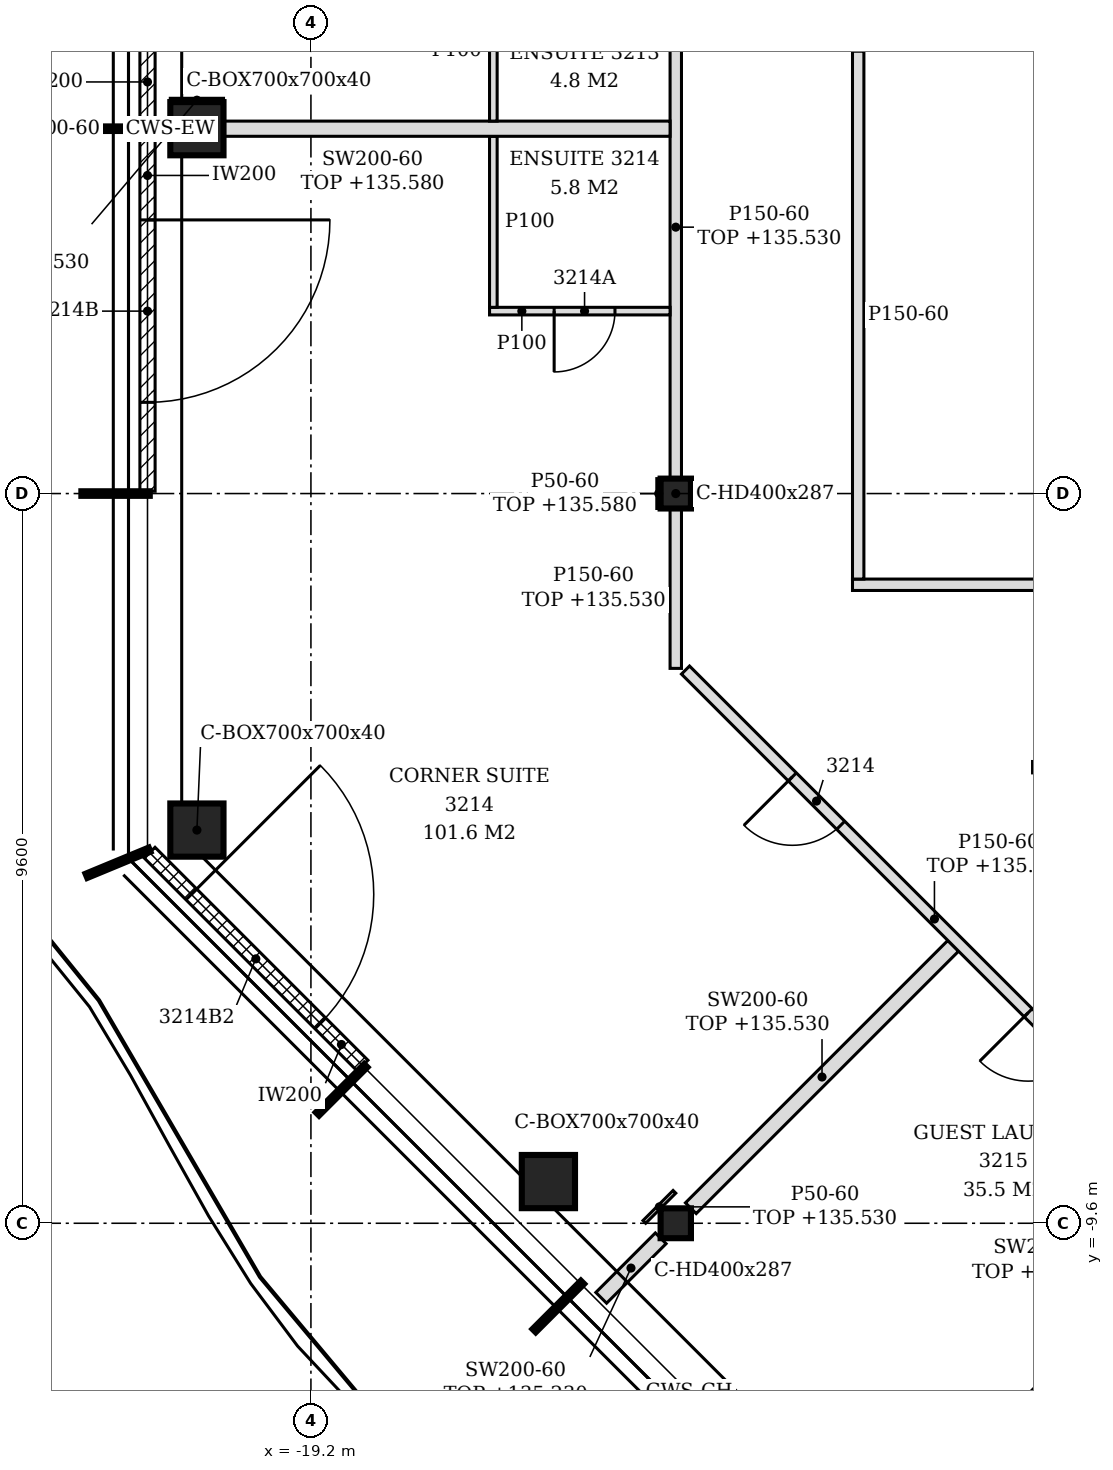
"""IFC4 building model, lengths in metres.
Left out: names, types, materials, properties, quantities, classifications, styles, units other than length and angle.
Written with IfcOpenShell. Run it as: python <this file> out.ifc"""

import sys

from ifc_helpers import new_model, si_unit, direction, frame, frame_2d, origin, origin_2d, place, context, subcontext, project, spatial, polyline, rectangle, hollow_rectangle, i_section, outline, extrude, element, fill, save


model = new_model("IFC4")
c1 = context("Model", 3, precision=1e-05, world=origin(), true_north=direction((0.0, 1.0)))
c2 = subcontext(c1, "Body", "Model", "MODEL_VIEW")
j1 = project(units=[si_unit("LENGTHUNIT", "METRE"), si_unit("PLANEANGLEUNIT", "RADIAN")], contexts=[c1])
p1 = place(None, origin())
s1 = spatial("IfcSite", under=j1, at=p1, CompositionType="ELEMENT")
p2 = place(p1, origin())
s2 = spatial("IfcBuilding", under=s1, at=p2, CompositionType="ELEMENT")
p3 = place(p2, frame((0.0, 0.0, 132.6)))
s3 = spatial("IfcBuildingStorey", under=s2, at=p3, CompositionType="ELEMENT", Elevation=132.6)
for number, where, z_axis, x_axis in (
    (1, (-20.7, 4.8, -0.15), (0.0, 0.0, 1.0), (1.0, 0.0, 0.0)),
    (2, (-20.7, -4.427, -0.15), (0.0, 0.0, 1.0), (1.0, 0.0, 0.0)),
    (3, (-16.076, -9.052, -0.15), (0.0, 0.0, 1.0), (1.0, 0.0, 0.0)),
):
    element("IfcColumn", number, at=place(p3, frame(where, z_axis=z_axis, x_axis=x_axis)), inside=s3, PredefinedType="COLUMN", context=c2, shape_type="SweptSolid", body=[
        extrude(hollow_rectangle(XDim=0.7, YDim=0.7, WallThickness=0.04, at=origin_2d()), origin(), (0.0, 0.0, 1.0), 3.6),
    ])
for number, where, z_axis, x_axis in (
    (4, (-14.4, -9.6, -0.15), (0.0, 0.0, 1.0), (1.0, 0.0, 0.0)),
    (5, (-14.4, 0.0, -0.15), (0.0, 0.0, 1.0), (1.0, 0.0, 0.0)),
):
    element("IfcColumn", number, at=place(p3, frame(where, z_axis=z_axis, x_axis=x_axis)), inside=s3, PredefinedType="COLUMN", context=c2, shape_type="SweptSolid", body=[
        extrude(i_section(OverallWidth=0.399, OverallDepth=0.393, WebThickness=0.023, FlangeThickness=0.037, FilletRadius=0.015, at=origin_2d()), origin(), (0.0, 0.0, 1.0), 3.6),
    ])
p4 = place(p3, frame((-21.35, 9.57, 0.0), z_axis=(0.0, 0.0, 1.0), x_axis=(0.0, -1.0, 0.0)))
e6 = element("IfcWall", 6, at=p4, inside=s3, PredefinedType="NOTDEFINED", context=c2, shape_type="SweptSolid", body=[
    extrude(rectangle(XDim=4.74, YDim=0.2, at=frame_2d((2.37, 0.0))), origin(), (0.0, 0.0, 1.0), 3.45),
])
p5 = place(p4, frame((1.17, 0.0, 0.0)))
e7 = element("IfcOpeningElement", 7, at=p5, cuts=e6, PredefinedType="OPENING", context=c2, shape_type="SweptSolid", body=[
    extrude(rectangle(XDim=2.4, YDim=2.4, at=frame_2d((1.2, 1.2))), frame((0.0, 0.11, 0.0), z_axis=(0.0, -1.0, 0.0), x_axis=(1.0, 0.0, 0.0)), (0.0, 0.0, 1.0), 0.22),
])
p6 = place(p3, frame((-21.35, 4.77, 0.0), z_axis=(0.0, 0.0, 1.0), x_axis=(0.0, -1.0, 0.0)))
e8 = element("IfcWall", 8, at=p6, inside=s3, PredefinedType="NOTDEFINED", context=c2, shape_type="SweptSolid", body=[
    extrude(rectangle(XDim=4.74, YDim=0.2, at=frame_2d((2.37, 0.0))), origin(), (0.0, 0.0, 1.0), 3.45),
])
p7 = place(p6, frame((1.17, 0.0, 0.0)))
e9 = element("IfcOpeningElement", 9, at=p7, cuts=e8, PredefinedType="OPENING", context=c2, shape_type="SweptSolid", body=[
    extrude(rectangle(XDim=2.4, YDim=2.4, at=frame_2d((1.2, 1.2))), frame((0.0, 0.11, 0.0), z_axis=(0.0, -1.0, 0.0), x_axis=(1.0, 0.0, 0.0)), (0.0, 0.0, 1.0), 0.22),
])
p8 = place(p3, frame((-21.322, -4.725, 0.0), z_axis=(0.0, 0.0, 1.0), x_axis=(0.707106781187, -0.707106781187, 0.0)))
e10 = element("IfcWall", 10, at=p8, inside=s3, PredefinedType="NOTDEFINED", context=c2, shape_type="SweptSolid", body=[
    extrude(rectangle(XDim=3.962, YDim=0.2, at=frame_2d((1.981, 0.0))), origin(), (0.0, 0.0, 1.0), 3.45),
])
p9 = place(p8, frame((0.775, 0.0, 0.0)))
e11 = element("IfcOpeningElement", 11, at=p9, cuts=e10, PredefinedType="OPENING", context=c2, shape_type="SweptSolid", body=[
    extrude(rectangle(XDim=2.4, YDim=2.4, at=frame_2d((1.2, 1.2))), frame((0.0, 0.11, 0.0), z_axis=(0.0, -1.0, 0.0), x_axis=(1.0, 0.0, 0.0)), (0.0, 0.0, 1.0), 0.22),
])
p10 = place(p3, frame((-11.102, -13.326, 0.0), z_axis=(0.0, 0.0, 1.0), x_axis=(0.707088722709, 0.707124839203, 0.0)))
e12 = element("IfcWall", 12, at=p10, inside=s3, PredefinedType="PARTITIONING", context=c2, shape_type="SweptSolid", body=[
    extrude(rectangle(XDim=6.76, YDim=0.2, at=frame_2d((3.38, 0.0))), origin(), (0.0, 0.0, 1.0), 2.93),
])
p11 = place(p3, frame((-15.381, -10.581, 0.0), z_axis=(0.0, 0.0, 1.0), x_axis=(0.707217034054, 0.706996511125, 0.0)))
e13 = element("IfcWall", 13, at=p11, inside=s3, PredefinedType="PARTITIONING", context=c2, shape_type="SweptSolid", body=[
    extrude(rectangle(XDim=1.107, YDim=0.2, at=frame_2d((0.554, 0.0))), origin(), (0.0, 0.0, 1.0), 2.63),
])
p12 = place(p3, frame((-14.202, -9.402, 0.0), z_axis=(0.0, 0.0, 1.0), x_axis=(0.707081776084, 0.707131785404, 0.0)))
e14 = element("IfcWall", 14, at=p12, inside=s3, PredefinedType="PARTITIONING", context=c2, shape_type="SweptSolid", body=[
    extrude(rectangle(XDim=4.882, YDim=0.2, at=frame_2d((2.441, 0.0))), origin(), (0.0, 0.0, 1.0), 2.93),
])
p13 = place(p3, frame((-8.322, -8.272, 0.0), z_axis=(0.0, 0.0, 1.0), x_axis=(-0.707106781187, 0.707106781187, 0.0)))
e15 = element("IfcWall", 15, at=p13, inside=s3, PredefinedType="PARTITIONING", context=c2, shape_type="SweptSolid", body=[
    extrude(rectangle(XDim=8.415, YDim=0.15, at=frame_2d((4.207, 0.0))), origin(), (0.0, 0.0, 1.0), 2.93),
])
p14 = place(p13, frame((5.527, 0.0, 0.0)))
e16 = element("IfcOpeningElement", 16, at=p14, cuts=e15, PredefinedType="OPENING", context=c2, shape_type="SweptSolid", body=[
    extrude(rectangle(XDim=0.9, YDim=2.1, at=frame_2d((0.45, 1.05))), frame((0.0, 0.085, 0.0), z_axis=(0.0, -1.0, 0.0), x_axis=(1.0, 0.0, 0.0)), (0.0, 0.0, 1.0), 0.17),
])
p15 = place(p13, frame((1.139, 0.0, 0.0)))
e17 = element("IfcOpeningElement", 17, at=p15, cuts=e15, PredefinedType="OPENING", context=c2, shape_type="SweptSolid", body=[
    extrude(rectangle(XDim=0.9, YDim=2.1, at=frame_2d((0.45, 1.05))), frame((0.0, 0.085, 0.0), z_axis=(0.0, -1.0, 0.0), x_axis=(1.0, 0.0, 0.0)), (0.0, 0.0, 1.0), 0.17),
])
p16 = place(p3, frame((-9.706, -3.6, 0.0), z_axis=(0.0, 0.0, 1.0), x_axis=(1.0, 0.0, 0.0)))
e18 = element("IfcWall", 18, at=p16, inside=s3, PredefinedType="PARTITIONING", context=c2, shape_type="SweptSolid", body=[
    extrude(outline(polyline([(0.0, 0.0), (4.981, 0.0), (4.981, 2.83), (4.756, 2.83), (4.754, 3.45), (0.0, 3.45), (0.0, 0.0)])), frame((0.0, 0.075, 0.0), z_axis=(0.0, -1.0, 0.0), x_axis=(1.0, 0.0, 0.0)), (0.0, 0.0, 1.0), 0.15),
])
p17 = place(p3, frame((-14.4, -2.3, 0.0), z_axis=(0.0, 0.0, 1.0), x_axis=(0.0, 1.0, 0.0)))
e19 = element("IfcWall", 19, at=p17, inside=s3, PredefinedType="PARTITIONING", context=c2, shape_type="SweptSolid", body=[
    extrude(rectangle(XDim=2.104, YDim=0.15, at=frame_2d((1.052, 0.0))), origin(), (0.0, 0.0, 1.0), 2.93),
])
p18 = place(p3, frame((-12.075, -1.2, 0.0), z_axis=(0.0, 0.0, 1.0), x_axis=(1.0, 0.0, 0.0)))
e20 = element("IfcWall", 20, at=p18, inside=s3, PredefinedType="PARTITIONING", context=c2, shape_type="SweptSolid", body=[
    extrude(outline(polyline([(0.0, 0.0), (7.35, 0.0), (7.35, 2.83), (7.125, 2.83), (7.123, 3.45), (0.0, 3.45), (0.0, 0.0)])), frame((0.0, 0.075, 0.0), z_axis=(0.0, -1.0, 0.0), x_axis=(1.0, 0.0, 0.0)), (0.0, 0.0, 1.0), 0.15),
])
p19 = place(p3, frame((-12.0, -1.125, 0.0), z_axis=(0.0, 0.0, 1.0), x_axis=(0.0, 1.0, 0.0)))
e21 = element("IfcWall", 21, at=p19, inside=s3, PredefinedType="PARTITIONING", context=c2, shape_type="SweptSolid", body=[
    extrude(outline(polyline([(0.0, 0.0), (6.944, 0.0), (6.944, 3.45), (6.025, 3.45), (6.023, 2.93), (5.825, 2.93), (5.823, 3.45), (1.225, 3.45), (1.223, 2.93), (1.025, 2.93), (1.023, 3.45), (0.0, 3.45), (0.0, 0.0)])), frame((0.0, 0.075, 0.0), z_axis=(0.0, -1.0, 0.0), x_axis=(1.0, 0.0, 0.0)), (0.0, 0.0, 1.0), 0.15),
])
p20 = place(p3, frame((-14.4, 0.197, 0.0), z_axis=(0.0, 0.0, 1.0), x_axis=(0.0, 1.0, 0.0)))
e22 = element("IfcWall", 22, at=p20, inside=s3, PredefinedType="PARTITIONING", context=c2, shape_type="SweptSolid", body=[
    extrude(rectangle(XDim=6.616, YDim=0.15, at=frame_2d((3.308, 0.0))), origin(), (0.0, 0.0, 1.0), 2.93),
])
p21 = place(p3, frame((-16.85, 2.4, 0.0), z_axis=(0.0, 0.0, 1.0), x_axis=(1.0, 0.0, 0.0)))
e23 = element("IfcWall", 23, at=p21, inside=s3, PredefinedType="PARTITIONING", context=c2, shape_type="SweptSolid", body=[
    extrude(outline(polyline([(0.0, 0.0), (2.375, 0.0), (2.375, 2.93), (2.3, 2.93), (2.298, 3.45), (0.0, 3.45), (0.0, 0.0)])), frame((0.0, 0.05, 0.0), z_axis=(0.0, -1.0, 0.0), x_axis=(1.0, 0.0, 0.0)), (0.0, 0.0, 1.0), 0.1),
])
p22 = place(p21, frame((0.85, 0.0, 0.0)))
e24 = element("IfcOpeningElement", 24, at=p22, cuts=e23, PredefinedType="OPENING", context=c2, shape_type="SweptSolid", body=[
    extrude(rectangle(XDim=0.8, YDim=2.1, at=frame_2d((0.4, 1.05))), frame((0.0, 0.06, 0.0), z_axis=(0.0, -1.0, 0.0), x_axis=(1.0, 0.0, 0.0)), (0.0, 0.0, 1.0), 0.12),
])
p23 = place(p3, frame((-16.8, 2.45, 0.0), z_axis=(0.0, 0.0, 1.0), x_axis=(0.0, 1.0, 0.0)))
e25 = element("IfcWall", 25, at=p23, inside=s3, PredefinedType="PARTITIONING", context=c2, shape_type="SweptSolid", body=[
    extrude(rectangle(XDim=2.25, YDim=0.1, at=frame_2d((1.125, 0.0))), origin(), (0.0, 0.0, 1.0), 3.45),
])
p24 = place(p3, frame((-21.25, 4.8, 0.0), z_axis=(0.0, 0.0, 1.0), x_axis=(1.0, 0.0, 0.0)))
e26 = element("IfcWall", 26, at=p24, inside=s3, PredefinedType="PARTITIONING", context=c2, shape_type="SweptSolid", body=[
    extrude(rectangle(XDim=0.2, YDim=0.2, at=frame_2d((0.1, 0.0))), origin(), (0.0, 0.0, 1.0), 3.45),
])
p25 = place(p3, frame((-20.35, 4.8, 0.0), z_axis=(0.0, 0.0, 1.0), x_axis=(1.0, 0.0, 0.0)))
e27 = element("IfcWall", 27, at=p25, inside=s3, PredefinedType="PARTITIONING", context=c2, shape_type="SweptSolid", body=[
    extrude(outline(polyline([(0.0, 0.0), (5.875, 0.0), (5.875, 2.93), (5.8, 2.93), (5.798, 2.98), (0.0, 2.98), (0.0, 0.0)])), frame((0.0, 0.1, 0.0), z_axis=(0.0, -1.0, 0.0), x_axis=(1.0, 0.0, 0.0)), (0.0, 0.0, 1.0), 0.2),
])
p26 = place(p3, frame((-16.8, 4.9, 0.0), z_axis=(0.0, 0.0, 1.0), x_axis=(0.0, 1.0, 0.0)))
e28 = element("IfcWall", 28, at=p26, inside=s3, PredefinedType="PARTITIONING", context=c2, shape_type="SweptSolid", body=[
    extrude(rectangle(XDim=1.85, YDim=0.1, at=frame_2d((0.925, 0.0))), origin(), (0.0, 0.0, 1.0), 3.45),
])
p27 = place(p3, frame((-14.814, -9.582, 0.0), z_axis=(0.0, 0.0, 1.0), x_axis=(0.707106781187, 0.707106781187, 0.0)))
e29 = element("IfcWall", 29, at=p27, inside=s3, PredefinedType="PARTITIONING", context=c2, shape_type="SweptSolid", body=[
    extrude(rectangle(XDim=0.56, YDim=0.05, at=frame_2d((0.28, 0.0))), origin(), (0.0, 0.0, 1.0), 2.93),
])
p28 = place(p3, frame((-14.625, -0.197, 0.0), z_axis=(0.0, 0.0, 1.0), x_axis=(0.0, 1.0, 0.0)))
e30 = element("IfcWall", 30, at=p28, inside=s3, PredefinedType="PARTITIONING", context=c2, shape_type="SweptSolid", body=[
    extrude(rectangle(XDim=0.393, YDim=0.05, at=frame_2d((0.197, 0.0))), origin(), (0.0, 0.0, 1.0), 2.98),
])
p29 = place(p3, frame((-21.05, 5.175, 0.0), z_axis=(0.0, 0.0, 1.0), x_axis=(1.0, 0.0, 0.0)))
e31 = element("IfcWall", 31, at=p29, inside=s3, PredefinedType="PARTITIONING", context=c2, shape_type="SweptSolid", body=[
    extrude(rectangle(XDim=0.7, YDim=0.05, at=frame_2d((0.35, 0.0))), origin(), (0.0, 0.0, 1.0), 2.93),
])
p30 = place(p7, origin())
e32 = element("IfcDoor", 32, at=p30, inside=s3, OperationType="SINGLE_SWING_LEFT", PredefinedType="DOOR", context=c2, shape_type="SweptSolid", body=[
    extrude(rectangle(XDim=2.4, YDim=2.4, at=frame_2d((1.2, 1.2))), frame((0.0, 0.025, 0.0), z_axis=(0.0, -1.0, 0.0), x_axis=(1.0, 0.0, 0.0)), (0.0, 0.0, 1.0), 0.05),
])
fill(e9, e32)
p31 = place(p9, origin())
e33 = element("IfcDoor", 33, at=p31, inside=s3, OperationType="SINGLE_SWING_LEFT", PredefinedType="DOOR", context=c2, shape_type="SweptSolid", body=[
    extrude(rectangle(XDim=2.4, YDim=2.4, at=frame_2d((1.2, 1.2))), frame((0.0, 0.025, 0.0), z_axis=(0.0, -1.0, 0.0), x_axis=(1.0, 0.0, 0.0)), (0.0, 0.0, 1.0), 0.05),
])
fill(e11, e33)
p32 = place(p14, origin())
e34 = element("IfcDoor", 34, at=p32, inside=s3, OperationType="SINGLE_SWING_RIGHT", PredefinedType="DOOR", context=c2, shape_type="SweptSolid", body=[
    extrude(rectangle(XDim=0.9, YDim=2.1, at=frame_2d((0.45, 1.05))), frame((0.0, 0.025, 0.0), z_axis=(0.0, -1.0, 0.0), x_axis=(1.0, 0.0, 0.0)), (0.0, 0.0, 1.0), 0.05),
])
fill(e16, e34)
p33 = place(p22, frame((0.8, 0.0, 0.0), z_axis=(0.0, 0.0, 1.0), x_axis=(-1.0, 0.0, 0.0)))
e35 = element("IfcDoor", 35, at=p33, inside=s3, OperationType="SINGLE_SWING_RIGHT", PredefinedType="DOOR", context=c2, shape_type="SweptSolid", body=[
    extrude(rectangle(XDim=0.8, YDim=2.1, at=frame_2d((0.4, 1.05))), frame((0.0, 0.025, 0.0), z_axis=(0.0, -1.0, 0.0), x_axis=(1.0, 0.0, 0.0)), (0.0, 0.0, 1.0), 0.05),
])
fill(e24, e35)
p34 = place(p15, origin())
e36 = element("IfcDoor", 36, at=p34, inside=s3, OperationType="SINGLE_SWING_RIGHT", PredefinedType="DOOR", context=c2, shape_type="SweptSolid", body=[
    extrude(rectangle(XDim=0.9, YDim=2.1, at=frame_2d((0.45, 1.05))), frame((0.0, 0.025, 0.0), z_axis=(0.0, -1.0, 0.0), x_axis=(1.0, 0.0, 0.0)), (0.0, 0.0, 1.0), 0.05),
])
fill(e17, e36)
save(model, sys.argv[1])
